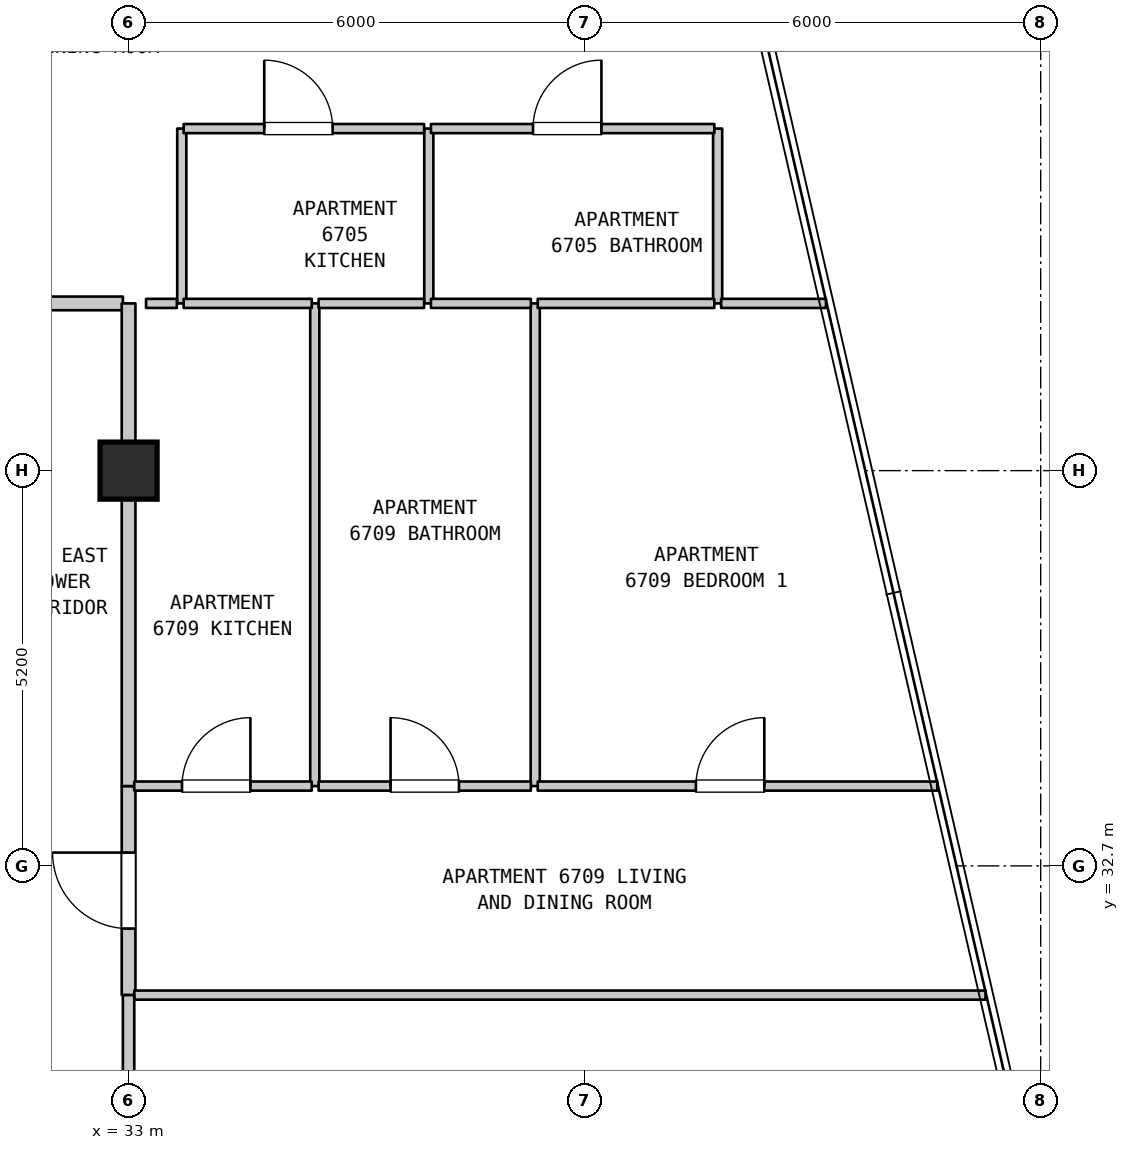
"""IFC4 building model, lengths in metres.
Left out: names, types, materials, properties, quantities, classifications, styles, units other than length and angle.
Written with IfcOpenShell. Run it as: python <this file> out.ifc"""

import sys

from ifc_helpers import new_model, si_unit, direction, frame, frame_2d, origin, origin_2d, place, context, subcontext, project, spatial, rectangle, extrude, element, fill, save


model = new_model("IFC4")
c1 = context("Model", 3, precision=1e-05, world=origin(), true_north=direction((0.0, 1.0)))
c2 = subcontext(c1, "Body", "Model", "MODEL_VIEW")
j1 = project(units=[si_unit("LENGTHUNIT", "METRE"), si_unit("PLANEANGLEUNIT", "RADIAN")], contexts=[c1])
p1 = place(None, origin())
s1 = spatial("IfcSite", under=j1, at=p1, CompositionType="ELEMENT")
p2 = place(p1, origin())
s2 = spatial("IfcBuilding", under=s1, at=p2, CompositionType="ELEMENT")
p3 = place(p2, frame((0.0, 0.0, 269.5)))
s3 = spatial("IfcBuildingStorey", under=s2, at=p3, CompositionType="ELEMENT", Elevation=269.5)
p4 = place(p3, frame((33.0, 37.9, 0.0), z_axis=(0.0, 0.0, 1.0), x_axis=(1.0, 0.0, 0.0)))
e1 = element("IfcColumn", 1, at=p4, inside=s3, PredefinedType="COLUMN", context=c2, shape_type="SweptSolid", body=[
    extrude(rectangle(XDim=0.75, YDim=0.75, at=origin_2d()), origin(), (0.0, 0.0, 1.0), 3.7),
])
p5 = place(p3, frame((33.0, 31.0, 0.0), z_axis=(0.0, 0.0, 1.0), x_axis=(0.0, 1.0, 0.0)))
e2 = element("IfcWall", 2, at=p5, inside=s3, PredefinedType="STANDARD", context=c2, shape_type="SweptSolid", body=[
    extrude(rectangle(XDim=2.75, YDim=0.18, at=frame_2d((1.375, 0.0))), origin(), (0.0, 0.0, 1.0), 2.89),
])
p6 = place(p5, frame((0.875, 0.0, 0.0)))
e3 = element("IfcOpeningElement", 3, at=p6, cuts=e2, PredefinedType="OPENING", context=c2, shape_type="SweptSolid", body=[
    extrude(rectangle(XDim=1.0, YDim=2.15, at=frame_2d((0.5, 1.075))), frame((0.0, 0.1, 0.0), z_axis=(0.0, -1.0, 0.0), x_axis=(1.0, 0.0, 0.0)), (0.0, 0.0, 1.0), 0.2),
])
p7 = place(p3, frame((33.0, 33.75, 0.0), z_axis=(0.0, 0.0, 1.0), x_axis=(0.0, 1.0, 0.0)))
e4 = element("IfcWall", 4, at=p7, inside=s3, PredefinedType="STANDARD", context=c2, shape_type="SweptSolid", body=[
    extrude(rectangle(XDim=4.15, YDim=0.18, at=frame_2d((2.075, 0.0))), origin(), (0.0, 0.0, 1.0), 2.89),
])
p8 = place(p3, frame((33.7, 40.1, 0.0), z_axis=(0.0, 0.0, 1.0), x_axis=(0.0, 1.0, 0.0)))
e5 = element("IfcWall", 5, at=p8, inside=s3, PredefinedType="PARTITIONING", context=c2, shape_type="SweptSolid", body=[
    extrude(rectangle(XDim=2.3, YDim=0.12, at=frame_2d((1.15, 0.0))), origin(), (0.0, 0.0, 1.0), 3.39),
])
p9 = place(p3, frame((35.45, 33.75, 0.0), z_axis=(0.0, 0.0, 1.0), x_axis=(0.0, 1.0, 0.0)))
e6 = element("IfcWall", 6, at=p9, inside=s3, PredefinedType="PARTITIONING", context=c2, shape_type="SweptSolid", body=[
    extrude(rectangle(XDim=6.35, YDim=0.12, at=frame_2d((3.175, 0.0))), origin(), (0.0, 0.0, 1.0), 3.39),
])
p10 = place(p3, frame((36.95, 40.1, 0.0), z_axis=(0.0, 0.0, 1.0), x_axis=(0.0, 1.0, 0.0)))
e7 = element("IfcWall", 7, at=p10, inside=s3, PredefinedType="PARTITIONING", context=c2, shape_type="SweptSolid", body=[
    extrude(rectangle(XDim=2.3, YDim=0.12, at=frame_2d((1.15, 0.0))), origin(), (0.0, 0.0, 1.0), 3.39),
])
p11 = place(p3, frame((38.35, 33.75, 0.0), z_axis=(0.0, 0.0, 1.0), x_axis=(0.0, 1.0, 0.0)))
e8 = element("IfcWall", 8, at=p11, inside=s3, PredefinedType="PARTITIONING", context=c2, shape_type="SweptSolid", body=[
    extrude(rectangle(XDim=6.35, YDim=0.12, at=frame_2d((3.175, 0.0))), origin(), (0.0, 0.0, 1.0), 3.39),
])
p12 = place(p3, frame((40.75, 40.1, 0.0), z_axis=(0.0, 0.0, 1.0), x_axis=(0.0, 1.0, 0.0)))
e9 = element("IfcWall", 9, at=p12, inside=s3, PredefinedType="PARTITIONING", context=c2, shape_type="SweptSolid", body=[
    extrude(rectangle(XDim=2.3, YDim=0.12, at=frame_2d((1.15, 0.0))), origin(), (0.0, 0.0, 1.0), 3.39),
])
p13 = place(p3, frame((33.075, 31.0, 0.0), z_axis=(0.0, 0.0, 1.0), x_axis=(1.0, 0.0, 0.0)))
e10 = element("IfcWall", 10, at=p13, inside=s3, PredefinedType="PARTITIONING", context=c2, shape_type="SweptSolid", body=[
    extrude(rectangle(XDim=11.199, YDim=0.12, at=frame_2d((5.6, 0.0))), origin(), (0.0, 0.0, 1.0), 3.39),
])
p14 = place(p3, frame((33.075, 33.75, 0.0), z_axis=(0.0, 0.0, 1.0), x_axis=(1.0, 0.0, 0.0)))
e11 = element("IfcWall", 11, at=p14, inside=s3, PredefinedType="PARTITIONING", context=c2, shape_type="SweptSolid", body=[
    extrude(rectangle(XDim=2.335, YDim=0.12, at=frame_2d((1.167, 0.0))), origin(), (0.0, 0.0, 1.0), 3.39),
])
p15 = place(p14, frame((0.628, 0.0, 0.0)))
e12 = element("IfcOpeningElement", 12, at=p15, cuts=e11, PredefinedType="OPENING", context=c2, shape_type="SweptSolid", body=[
    extrude(rectangle(XDim=0.9, YDim=2.15, at=frame_2d((0.45, 1.075))), frame((0.0, 0.07, 0.0), z_axis=(0.0, -1.0, 0.0), x_axis=(1.0, 0.0, 0.0)), (0.0, 0.0, 1.0), 0.14),
])
p16 = place(p3, frame((35.5, 33.75, 0.0), z_axis=(0.0, 0.0, 1.0), x_axis=(1.0, 0.0, 0.0)))
e13 = element("IfcWall", 13, at=p16, inside=s3, PredefinedType="PARTITIONING", context=c2, shape_type="SweptSolid", body=[
    extrude(rectangle(XDim=2.793, YDim=0.12, at=frame_2d((1.396, 0.0))), origin(), (0.0, 0.0, 1.0), 3.39),
])
p17 = place(p16, frame((0.947, 0.0, 0.0)))
e14 = element("IfcOpeningElement", 14, at=p17, cuts=e13, PredefinedType="OPENING", context=c2, shape_type="SweptSolid", body=[
    extrude(rectangle(XDim=0.9, YDim=2.1, at=frame_2d((0.45, 1.05))), frame((0.0, 0.07, 0.0), z_axis=(0.0, -1.0, 0.0), x_axis=(1.0, 0.0, 0.0)), (0.0, 0.0, 1.0), 0.14),
])
p18 = place(p3, frame((38.383, 33.75, 0.0), z_axis=(0.0, 0.0, 1.0), x_axis=(1.0, 0.0, 0.0)))
e15 = element("IfcWall", 15, at=p18, inside=s3, PredefinedType="PARTITIONING", context=c2, shape_type="SweptSolid", body=[
    extrude(rectangle(XDim=5.257, YDim=0.12, at=frame_2d((2.628, 0.0))), origin(), (0.0, 0.0, 1.0), 3.39),
])
p19 = place(p18, frame((2.081, 0.0, 0.0)))
e16 = element("IfcOpeningElement", 16, at=p19, cuts=e15, PredefinedType="OPENING", context=c2, shape_type="SweptSolid", body=[
    extrude(rectangle(XDim=0.9, YDim=2.15, at=frame_2d((0.45, 1.075))), frame((0.0, 0.07, 0.0), z_axis=(0.0, -1.0, 0.0), x_axis=(1.0, 0.0, 0.0)), (0.0, 0.0, 1.0), 0.14),
])
p20 = place(p3, frame((23.36, 40.1, 0.0), z_axis=(0.0, 0.0, 1.0), x_axis=(1.0, 0.0, 0.0)))
e17 = element("IfcWall", 17, at=p20, inside=s3, PredefinedType="STANDARD", context=c2, shape_type="SweptSolid", body=[
    extrude(rectangle(XDim=9.565, YDim=0.18, at=frame_2d((4.782, 0.0))), origin(), (0.0, 0.0, 1.0), 3.39),
])
p21 = place(p20, frame((1.97, 0.0, 0.0)))
e18 = element("IfcOpeningElement", 18, at=p21, cuts=e17, PredefinedType="OPENING", context=c2, shape_type="SweptSolid", body=[
    extrude(rectangle(XDim=1.0, YDim=2.15, at=frame_2d((0.5, 1.075))), frame((0.0, 0.1, 0.0), z_axis=(0.0, -1.0, 0.0), x_axis=(1.0, 0.0, 0.0)), (0.0, 0.0, 1.0), 0.2),
])
p22 = place(p20, frame((6.793, 0.0, 0.0)))
e19 = element("IfcOpeningElement", 19, at=p22, cuts=e17, PredefinedType="OPENING", context=c2, shape_type="SweptSolid", body=[
    extrude(rectangle(XDim=1.0, YDim=2.15, at=frame_2d((0.5, 1.075))), frame((0.0, 0.1, 0.0), z_axis=(0.0, -1.0, 0.0), x_axis=(1.0, 0.0, 0.0)), (0.0, 0.0, 1.0), 0.2),
])
p23 = place(p3, frame((33.23, 40.1, 0.0), z_axis=(0.0, 0.0, 1.0), x_axis=(1.0, 0.0, 0.0)))
e20 = element("IfcWall", 20, at=p23, inside=s3, PredefinedType="PARTITIONING", context=c2, shape_type="SweptSolid", body=[
    extrude(rectangle(XDim=0.405, YDim=0.12, at=frame_2d((0.203, 0.0))), origin(), (0.0, 0.0, 1.0), 3.39),
])
p24 = place(p3, frame((33.725, 40.1, 0.0), z_axis=(0.0, 0.0, 1.0), x_axis=(1.0, 0.0, 0.0)))
e21 = element("IfcWall", 21, at=p24, inside=s3, PredefinedType="PARTITIONING", context=c2, shape_type="SweptSolid", body=[
    extrude(rectangle(XDim=1.685, YDim=0.12, at=frame_2d((0.842, 0.0))), origin(), (0.0, 0.0, 1.0), 3.39),
])
p25 = place(p3, frame((35.5, 40.1, 0.0), z_axis=(0.0, 0.0, 1.0), x_axis=(1.0, 0.0, 0.0)))
e22 = element("IfcWall", 22, at=p25, inside=s3, PredefinedType="PARTITIONING", context=c2, shape_type="SweptSolid", body=[
    extrude(rectangle(XDim=1.388, YDim=0.12, at=frame_2d((0.694, 0.0))), origin(), (0.0, 0.0, 1.0), 3.39),
])
p26 = place(p3, frame((36.978, 40.1, 0.0), z_axis=(0.0, 0.0, 1.0), x_axis=(1.0, 0.0, 0.0)))
e23 = element("IfcWall", 23, at=p26, inside=s3, PredefinedType="PARTITIONING", context=c2, shape_type="SweptSolid", body=[
    extrude(rectangle(XDim=1.315, YDim=0.12, at=frame_2d((0.657, 0.0))), origin(), (0.0, 0.0, 1.0), 3.39),
])
p27 = place(p3, frame((38.383, 40.1, 0.0), z_axis=(0.0, 0.0, 1.0), x_axis=(1.0, 0.0, 0.0)))
e24 = element("IfcWall", 24, at=p27, inside=s3, PredefinedType="PARTITIONING", context=c2, shape_type="SweptSolid", body=[
    extrude(rectangle(XDim=2.323, YDim=0.12, at=frame_2d((1.162, 0.0))), origin(), (0.0, 0.0, 1.0), 3.39),
])
p28 = place(p3, frame((40.796, 40.1, 0.0), z_axis=(0.0, 0.0, 1.0), x_axis=(1.0, 0.0, 0.0)))
e25 = element("IfcWall", 25, at=p28, inside=s3, PredefinedType="PARTITIONING", context=c2, shape_type="SweptSolid", body=[
    extrude(rectangle(XDim=1.379, YDim=0.12, at=frame_2d((0.689, 0.0))), origin(), (0.0, 0.0, 1.0), 3.39),
])
p29 = place(p3, frame((33.725, 42.4, 0.0), z_axis=(0.0, 0.0, 1.0), x_axis=(1.0, 0.0, 0.0)))
e26 = element("IfcWall", 26, at=p29, inside=s3, PredefinedType="PARTITIONING", context=c2, shape_type="SweptSolid", body=[
    extrude(rectangle(XDim=3.163, YDim=0.12, at=frame_2d((1.582, 0.0))), origin(), (0.0, 0.0, 1.0), 3.39),
])
p30 = place(p29, frame((1.06, 0.0, 0.0)))
e27 = element("IfcOpeningElement", 27, at=p30, cuts=e26, PredefinedType="OPENING", context=c2, shape_type="SweptSolid", body=[
    extrude(rectangle(XDim=0.9, YDim=2.15, at=frame_2d((0.45, 1.075))), frame((0.0, 0.07, 0.0), z_axis=(0.0, -1.0, 0.0), x_axis=(1.0, 0.0, 0.0)), (0.0, 0.0, 1.0), 0.14),
])
p31 = place(p3, frame((36.978, 42.4, 0.0), z_axis=(0.0, 0.0, 1.0), x_axis=(1.0, 0.0, 0.0)))
e28 = element("IfcWall", 28, at=p31, inside=s3, PredefinedType="PARTITIONING", context=c2, shape_type="SweptSolid", body=[
    extrude(rectangle(XDim=3.728, YDim=0.12, at=frame_2d((1.864, 0.0))), origin(), (0.0, 0.0, 1.0), 3.39),
])
p32 = place(p31, frame((1.343, 0.0, 0.0)))
e29 = element("IfcOpeningElement", 29, at=p32, cuts=e28, PredefinedType="OPENING", context=c2, shape_type="SweptSolid", body=[
    extrude(rectangle(XDim=0.9, YDim=2.1, at=frame_2d((0.45, 1.05))), frame((0.0, 0.07, 0.0), z_axis=(0.0, -1.0, 0.0), x_axis=(1.0, 0.0, 0.0)), (0.0, 0.0, 1.0), 0.14),
])
p33 = place(p3, frame((33.0, 27.9, 0.0), z_axis=(0.0, 0.0, 1.0), x_axis=(0.0, 1.0, 0.0)))
e30 = element("IfcWall", 30, at=p33, inside=s3, PredefinedType="STANDARD", context=c2, shape_type="SweptSolid", body=[
    extrude(rectangle(XDim=3.1, YDim=0.15, at=frame_2d((1.55, 0.0))), origin(), (0.0, 0.0, 1.0), 2.89),
])
p34 = place(p3, frame((33.0, 37.9, 0.0), z_axis=(0.0, 0.0, 1.0), x_axis=(0.0, 1.0, 0.0)))
e31 = element("IfcWall", 31, at=p34, inside=s3, PredefinedType="STANDARD", context=c2, shape_type="SweptSolid", body=[
    extrude(rectangle(XDim=2.2, YDim=0.18, at=frame_2d((1.1, 0.0))), origin(), (0.0, 0.0, 1.0), 2.79),
])
p35 = place(p6, origin())
e32 = element("IfcDoor", 32, at=p35, inside=s3, OperationType="SINGLE_SWING_RIGHT", PredefinedType="DOOR", context=c2, shape_type="SweptSolid", body=[
    extrude(rectangle(XDim=1.0, YDim=2.15, at=frame_2d((0.5, 1.075))), frame((0.0, 0.025, 0.0), z_axis=(0.0, -1.0, 0.0), x_axis=(1.0, 0.0, 0.0)), (0.0, 0.0, 1.0), 0.05),
])
fill(e3, e32)
p36 = place(p15, origin())
e33 = element("IfcDoor", 33, at=p36, inside=s3, OperationType="SINGLE_SWING_RIGHT", PredefinedType="DOOR", context=c2, shape_type="SweptSolid", body=[
    extrude(rectangle(XDim=0.9, YDim=2.15, at=frame_2d((0.45, 1.075))), frame((0.0, 0.025, 0.0), z_axis=(0.0, -1.0, 0.0), x_axis=(1.0, 0.0, 0.0)), (0.0, 0.0, 1.0), 0.05),
])
fill(e12, e33)
p37 = place(p17, origin())
e34 = element("IfcDoor", 34, at=p37, inside=s3, OperationType="SINGLE_SWING_LEFT", PredefinedType="DOOR", context=c2, shape_type="SweptSolid", body=[
    extrude(rectangle(XDim=0.9, YDim=2.1, at=frame_2d((0.45, 1.05))), frame((0.0, 0.025, 0.0), z_axis=(0.0, -1.0, 0.0), x_axis=(1.0, 0.0, 0.0)), (0.0, 0.0, 1.0), 0.05),
])
fill(e14, e34)
p38 = place(p19, origin())
e35 = element("IfcDoor", 35, at=p38, inside=s3, OperationType="SINGLE_SWING_RIGHT", PredefinedType="DOOR", context=c2, shape_type="SweptSolid", body=[
    extrude(rectangle(XDim=0.9, YDim=2.15, at=frame_2d((0.45, 1.075))), frame((0.0, 0.025, 0.0), z_axis=(0.0, -1.0, 0.0), x_axis=(1.0, 0.0, 0.0)), (0.0, 0.0, 1.0), 0.05),
])
fill(e16, e35)
p39 = place(p30, origin())
e36 = element("IfcDoor", 36, at=p39, inside=s3, OperationType="SINGLE_SWING_LEFT", PredefinedType="DOOR", context=c2, shape_type="SweptSolid", body=[
    extrude(rectangle(XDim=0.9, YDim=2.15, at=frame_2d((0.45, 1.075))), frame((0.0, 0.025, 0.0), z_axis=(0.0, -1.0, 0.0), x_axis=(1.0, 0.0, 0.0)), (0.0, 0.0, 1.0), 0.05),
])
fill(e27, e36)
p40 = place(p32, origin())
e37 = element("IfcDoor", 37, at=p40, inside=s3, OperationType="SINGLE_SWING_RIGHT", PredefinedType="DOOR", context=c2, shape_type="SweptSolid", body=[
    extrude(rectangle(XDim=0.9, YDim=2.1, at=frame_2d((0.45, 1.05))), frame((0.0, 0.025, 0.0), z_axis=(0.0, -1.0, 0.0), x_axis=(1.0, 0.0, 0.0)), (0.0, 0.0, 1.0), 0.05),
])
fill(e29, e37)
save(model, sys.argv[1])
